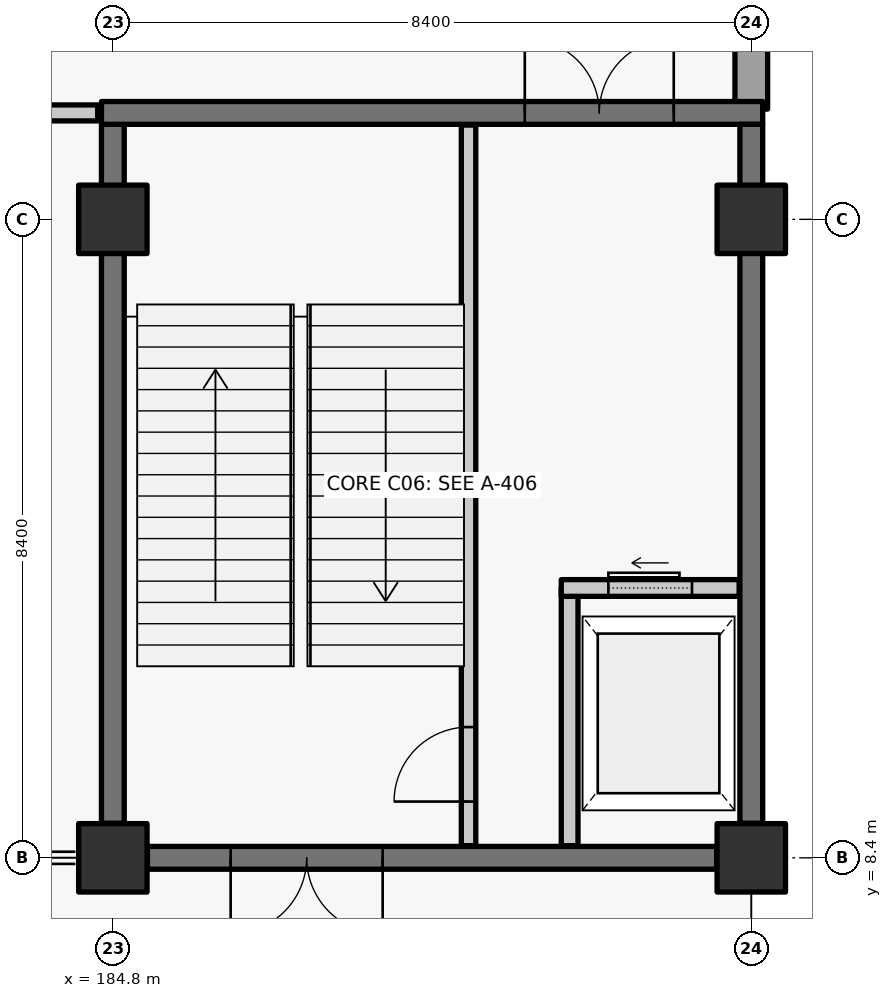
"""IFC4 building model, lengths in metres.
Left out: names, types, materials, properties, quantities, classifications, styles, units other than length and angle.
Written with IfcOpenShell. Run it as: python <this file> out.ifc"""

import sys

from ifc_helpers import new_model, si_unit, direction, frame, frame_2d, origin, origin_2d, place, context, subcontext, project, spatial, rectangle, extrude, element, fill, save


model = new_model("IFC4")
c1 = context("Model", 3, precision=1e-05, world=origin(), true_north=direction((0.0, 1.0)))
c2 = subcontext(c1, "Body", "Model", "MODEL_VIEW")
j1 = project(units=[si_unit("LENGTHUNIT", "METRE"), si_unit("PLANEANGLEUNIT", "RADIAN")], contexts=[c1])
p1 = place(None, origin())
s1 = spatial("IfcSite", under=j1, at=p1, CompositionType="ELEMENT")
p2 = place(p1, origin())
s2 = spatial("IfcBuilding", under=s1, at=p2, CompositionType="ELEMENT")
p3 = place(p2, origin())
s3 = spatial("IfcBuildingStorey", under=s2, at=p3, CompositionType="ELEMENT", Elevation=0.0)
for number, where, z_axis, x_axis in (
    (1, (184.8, 8.4, -0.36), (0.0, 0.0, 1.0), (1.0, 0.0, 0.0)),
    (2, (184.8, 16.8, -0.36), (0.0, 0.0, 1.0), (1.0, 0.0, 0.0)),
    (3, (193.2, 8.4, -0.36), (0.0, 0.0, 1.0), (1.0, 0.0, 0.0)),
    (4, (193.2, 16.8, -0.36), (0.0, 0.0, 1.0), (1.0, 0.0, 0.0)),
):
    element("IfcColumn", number, at=place(p3, frame(where, z_axis=z_axis, x_axis=x_axis)), inside=s3, PredefinedType="COLUMN", context=c2, shape_type="SweptSolid", body=[
        extrude(rectangle(XDim=0.9, YDim=0.9, at=origin_2d()), origin(), (0.0, 0.0, 1.0), 6.36),
    ])
p4 = place(p3, frame((193.2, 24.745, 0.0), z_axis=(0.0, 0.0, 1.0), x_axis=(0.0, -1.0, 0.0)))
e5 = element("IfcWall", 5, at=p4, inside=s3, PredefinedType="SOLIDWALL", context=c2, shape_type="SweptSolid", body=[
    extrude(rectangle(XDim=6.495, YDim=0.43, at=frame_2d((3.248, 0.0))), origin(), (0.0, 0.0, 1.0), 5.72),
])
p5 = place(p4, frame((2.345, 0.0, 1.0)))
e6 = element("IfcOpeningElement", 6, at=p5, cuts=e5, PredefinedType="OPENING", context=c2, shape_type="SweptSolid", body=[
    extrude(rectangle(XDim=1.8, YDim=1.65, at=frame_2d((0.9, 0.825))), frame((0.0, 0.225, 0.0), z_axis=(0.0, -1.0, 0.0), x_axis=(1.0, 0.0, 0.0)), (0.0, 0.0, 1.0), 0.45),
])
p6 = place(p3, frame((192.745, 8.4, -0.36), z_axis=(0.0, 0.0, 1.0), x_axis=(-1.0, 0.0, 0.0)))
e7 = element("IfcWall", 7, at=p6, inside=s3, PredefinedType="SHEAR", context=c2, shape_type="SweptSolid", body=[
    extrude(rectangle(XDim=7.49, YDim=0.3, at=frame_2d((3.745, 0.0))), origin(), (0.0, 0.0, 1.0), 6.08),
])
p7 = place(p6, frame((4.395, 0.0, 0.36)))
e8 = element("IfcOpeningElement", 8, at=p7, cuts=e7, PredefinedType="OPENING", context=c2, shape_type="SweptSolid", body=[
    extrude(rectangle(XDim=2.0, YDim=2.28, at=frame_2d((1.0, 1.14))), frame((0.0, 0.16, 0.0), z_axis=(0.0, -1.0, 0.0), x_axis=(1.0, 0.0, 0.0)), (0.0, 0.0, 1.0), 0.32),
])
p8 = place(p3, frame((184.8, 8.855, -0.36), z_axis=(0.0, 0.0, 1.0), x_axis=(0.0, 1.0, 0.0)))
e9 = element("IfcWall", 9, at=p8, inside=s3, PredefinedType="SHEAR", context=c2, shape_type="SweptSolid", body=[
    extrude(rectangle(XDim=9.195, YDim=0.3, at=frame_2d((4.598, 0.0))), origin(), (0.0, 0.0, 1.0), 6.08),
])
p9 = place(p3, frame((184.65, 18.2, -0.36), z_axis=(0.0, 0.0, 1.0), x_axis=(1.0, 0.0, 0.0)))
e10 = element("IfcWall", 10, at=p9, inside=s3, PredefinedType="SHEAR", context=c2, shape_type="SweptSolid", body=[
    extrude(rectangle(XDim=8.7, YDim=0.3, at=frame_2d((4.35, 0.0))), origin(), (0.0, 0.0, 1.0), 6.08),
])
p10 = place(p9, frame((5.57, 0.0, 0.36)))
e11 = element("IfcOpeningElement", 11, at=p10, cuts=e10, PredefinedType="OPENING", context=c2, shape_type="SweptSolid", body=[
    extrude(rectangle(XDim=1.96, YDim=2.2, at=frame_2d((0.98, 1.1))), frame((0.0, 0.16, 0.0), z_axis=(0.0, -1.0, 0.0), x_axis=(1.0, 0.0, 0.0)), (0.0, 0.0, 1.0), 0.32),
])
p11 = place(p3, frame((193.2, 18.05, -0.36), z_axis=(0.0, 0.0, 1.0), x_axis=(0.0, -1.0, 0.0)))
e12 = element("IfcWall", 12, at=p11, inside=s3, PredefinedType="SHEAR", context=c2, shape_type="SweptSolid", body=[
    extrude(rectangle(XDim=9.195, YDim=0.3, at=frame_2d((4.598, 0.0))), origin(), (0.0, 0.0, 1.0), 6.08),
])
p12 = place(p3, frame((189.48, 8.56, -0.36), z_axis=(0.0, 0.0, 1.0), x_axis=(0.0, 1.0, 0.0)))
e13 = element("IfcWall", 13, at=p12, inside=s3, PredefinedType="SOLIDWALL", context=c2, shape_type="SweptSolid", body=[
    extrude(rectangle(XDim=9.48, YDim=0.19, at=frame_2d((4.74, 0.0))), origin(), (0.0, 0.0, 1.0), 6.08),
])
p13 = place(p12, frame((0.58, 0.0, 0.36)))
e14 = element("IfcOpeningElement", 14, at=p13, cuts=e13, PredefinedType="OPENING", context=c2, shape_type="SweptSolid", body=[
    extrude(rectangle(XDim=0.98, YDim=2.15, at=frame_2d((0.49, 1.075))), frame((0.0, 0.105, 0.0), z_axis=(0.0, -1.0, 0.0), x_axis=(1.0, 0.0, 0.0)), (0.0, 0.0, 1.0), 0.21),
])
p14 = place(p3, frame((190.81, 8.56, 0.0), z_axis=(0.0, 0.0, 1.0), x_axis=(0.0, 1.0, 0.0)))
e15 = element("IfcWall", 15, at=p14, inside=s3, PredefinedType="SOLIDWALL", context=c2, shape_type="SweptSolid", body=[
    extrude(rectangle(XDim=3.39, YDim=0.22, at=frame_2d((1.695, 0.0))), origin(), (0.0, 0.0, 1.0), 5.72),
])
p15 = place(p3, frame((190.7, 11.95, 0.0), z_axis=(0.0, 0.0, 1.0), x_axis=(1.0, 0.0, 0.0)))
e16 = element("IfcWall", 16, at=p15, inside=s3, PredefinedType="SOLIDWALL", context=c2, shape_type="SweptSolid", body=[
    extrude(rectangle(XDim=2.34, YDim=0.22, at=frame_2d((1.17, 0.0))), origin(), (0.0, 0.0, 1.0), 5.72),
])
p16 = place(p15, frame((0.62, 0.0, 0.0)))
e17 = element("IfcOpeningElement", 17, at=p16, cuts=e16, PredefinedType="OPENING", context=c2, shape_type="SweptSolid", body=[
    extrude(rectangle(XDim=1.1, YDim=2.2, at=frame_2d((0.55, 1.1))), frame((0.0, 0.12, 0.0), z_axis=(0.0, -1.0, 0.0), x_axis=(1.0, 0.0, 0.0)), (0.0, 0.0, 1.0), 0.24),
])
p17 = place(p3, frame((151.4, 18.2, 0.0), z_axis=(0.0, 0.0, 1.0), x_axis=(1.0, 0.0, 0.0)))
e18 = element("IfcWall", 18, at=p17, inside=s3, PredefinedType="PARTITIONING", context=c2, shape_type="SweptSolid", body=[
    extrude(rectangle(XDim=33.2, YDim=0.21, at=frame_2d((16.6, 0.0))), origin(), (0.0, 0.0, 1.0), 5.72),
])
p18 = place(p17, frame((3.41, 0.0, 0.0)))
e19 = element("IfcOpeningElement", 19, at=p18, cuts=e18, PredefinedType="OPENING", context=c2, shape_type="SweptSolid", body=[
    extrude(rectangle(XDim=1.18, YDim=2.16, at=frame_2d((0.59, 1.08))), frame((0.0, 0.115, 0.0), z_axis=(0.0, -1.0, 0.0), x_axis=(1.0, 0.0, 0.0)), (0.0, 0.0, 1.0), 0.23),
])
p19 = place(p17, frame((28.61, 0.0, 0.0)))
e20 = element("IfcOpeningElement", 20, at=p19, cuts=e18, PredefinedType="OPENING", context=c2, shape_type="SweptSolid", body=[
    extrude(rectangle(XDim=1.18, YDim=2.16, at=frame_2d((0.59, 1.08))), frame((0.0, 0.115, 0.0), z_axis=(0.0, -1.0, 0.0), x_axis=(1.0, 0.0, 0.0)), (0.0, 0.0, 1.0), 0.23),
])
p20 = place(p13, origin())
e21 = element("IfcDoor", 21, at=p20, inside=s3, OperationType="SINGLE_SWING_LEFT", PredefinedType="DOOR", context=c2, shape_type="SweptSolid", body=[
    extrude(rectangle(XDim=0.98, YDim=2.15, at=frame_2d((0.49, 1.075))), frame((0.0, 0.025, 0.0), z_axis=(0.0, -1.0, 0.0), x_axis=(1.0, 0.0, 0.0)), (0.0, 0.0, 1.0), 0.05),
])
fill(e14, e21)
p21 = place(p10, origin())
e22 = element("IfcDoor", 22, at=p21, inside=s3, OperationType="DOUBLE_DOOR_SINGLE_SWING", PredefinedType="DOOR", context=c2, shape_type="SweptSolid", body=[
    extrude(rectangle(XDim=1.96, YDim=2.2, at=frame_2d((0.98, 1.1))), frame((0.0, 0.025, 0.0), z_axis=(0.0, -1.0, 0.0), x_axis=(1.0, 0.0, 0.0)), (0.0, 0.0, 1.0), 0.05),
])
fill(e11, e22)
p22 = place(p7, origin())
e23 = element("IfcDoor", 23, at=p22, inside=s3, OperationType="DOUBLE_DOOR_SINGLE_SWING", PredefinedType="DOOR", context=c2, shape_type="SweptSolid", body=[
    extrude(rectangle(XDim=2.0, YDim=2.28, at=frame_2d((1.0, 1.14))), frame((0.0, 0.025, 0.0), z_axis=(0.0, -1.0, 0.0), x_axis=(1.0, 0.0, 0.0)), (0.0, 0.0, 1.0), 0.05),
])
fill(e8, e23)
p23 = place(p16, origin())
e24 = element("IfcDoor", 24, at=p23, inside=s3, OperationType="SLIDING_TO_LEFT", PredefinedType="DOOR", context=c2, shape_type="SweptSolid", body=[
    extrude(rectangle(XDim=1.1, YDim=2.2, at=frame_2d((0.55, 1.1))), frame((0.0, 0.025, 0.0), z_axis=(0.0, -1.0, 0.0), x_axis=(1.0, 0.0, 0.0)), (0.0, 0.0, 1.0), 0.05),
])
fill(e17, e24)
save(model, sys.argv[1])
